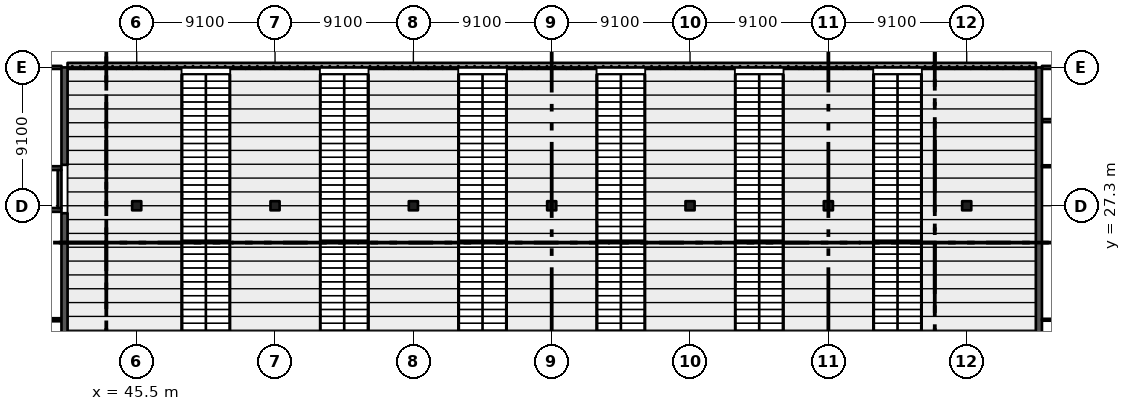
"""IFC4 building model, lengths in metres.
Left out: names, types, materials, properties, quantities, classifications, styles, units other than length and angle.
Written with IfcOpenShell. Run it as: python <this file> out.ifc"""

import sys

from ifc_helpers import new_model, si_unit, direction, frame, frame_2d, origin, origin_2d, place, context, subcontext, project, spatial, rectangle, extrude, element, save


model = new_model("IFC4")
c1 = context("Model", 3, precision=1e-05, world=origin(), true_north=direction((0.0, 1.0)))
c2 = subcontext(c1, "Body", "Model", "MODEL_VIEW")
j1 = project(units=[si_unit("LENGTHUNIT", "METRE"), si_unit("PLANEANGLEUNIT", "RADIAN")], contexts=[c1])
p1 = place(None, origin())
s1 = spatial("IfcSite", under=j1, at=p1, CompositionType="ELEMENT")
p2 = place(p1, origin())
s2 = spatial("IfcBuilding", under=s1, at=p2, CompositionType="ELEMENT")
p3 = place(p2, origin())
s3 = spatial("IfcBuildingStorey", under=s2, at=p3, CompositionType="ELEMENT", Elevation=0.0)
for number, where, z_axis, x_axis in (
    (1, (45.5, 27.3, -0.4), (0.0, 0.0, 1.0), (1.0, 0.0, 0.0)),
    (2, (54.6, 27.3, -0.4), (0.0, 0.0, 1.0), (1.0, 0.0, 0.0)),
    (3, (63.7, 27.3, -0.4), (0.0, 0.0, 1.0), (1.0, 0.0, 0.0)),
    (4, (72.8, 27.3, -0.4), (0.0, 0.0, 1.0), (1.0, 0.0, 0.0)),
    (5, (81.9, 27.3, -0.4), (0.0, 0.0, 1.0), (1.0, 0.0, 0.0)),
    (6, (91.0, 27.3, -0.4), (0.0, 0.0, 1.0), (1.0, 0.0, 0.0)),
    (7, (100.1, 27.3, -0.4), (0.0, 0.0, 1.0), (1.0, 0.0, 0.0)),
):
    element("IfcColumn", number, at=place(p3, frame(where, z_axis=z_axis, x_axis=x_axis)), inside=s3, PredefinedType="COLUMN", context=c2, shape_type="SweptSolid", body=[
        extrude(rectangle(XDim=0.6, YDim=0.6, at=origin_2d()), origin(), (0.0, 0.0, 1.0), 2.133),
    ])
p4 = place(p3, frame((40.95, 36.55, -0.4), z_axis=(0.0, 0.0, 1.0), x_axis=(1.0, 0.0, 0.0)))
e8 = element("IfcWall", 8, at=p4, inside=s3, PredefinedType="SOLIDWALL", context=c2, shape_type="SweptSolid", body=[
    extrude(rectangle(XDim=63.7, YDim=0.3, at=frame_2d((31.85, 0.0))), origin(), (0.0, 0.0, 1.0), 1.45),
])
p5 = place(p3, frame((40.75, 26.809, -0.4), z_axis=(0.0, 0.0, 1.0), x_axis=(0.0, -1.0, 0.0)))
e9 = element("IfcWall", 9, at=p5, inside=s3, PredefinedType="SHEAR", context=c2, shape_type="SweptSolid", body=[
    extrude(rectangle(XDim=8.609, YDim=0.4, at=frame_2d((4.304, 0.0))), origin(), (0.0, 0.0, 1.0), 6.77),
])
p6 = place(p3, frame((40.75, 36.4, -0.4), z_axis=(0.0, 0.0, 1.0), x_axis=(0.0, -1.0, 0.0)))
e10 = element("IfcWall", 10, at=p6, inside=s3, PredefinedType="SHEAR", context=c2, shape_type="SweptSolid", body=[
    extrude(rectangle(XDim=6.409, YDim=0.4, at=frame_2d((3.205, 0.0))), origin(), (0.0, 0.0, 1.0), 6.77),
])
p7 = place(p3, frame((104.85, 36.4, -0.4), z_axis=(0.0, 0.0, 1.0), x_axis=(0.0, -1.0, 0.0)))
e11 = element("IfcWall", 11, at=p7, inside=s3, PredefinedType="SHEAR", context=c2, shape_type="SweptSolid", body=[
    extrude(rectangle(XDim=18.2, YDim=0.4, at=frame_2d((9.1, 0.0))), origin(), (0.0, 0.0, 1.0), 6.77),
])
for number, where, z_axis, x_axis in (
    (12, (40.55, 27.025, -0.4), (0.0, 0.0, 1.0), (-1.0, 0.0, 0.0)),
    (13, (40.55, 29.775, -0.4), (0.0, 0.0, 1.0), (-1.0, 0.0, 0.0)),
):
    element("IfcWall", number, at=place(p3, frame(where, z_axis=z_axis, x_axis=x_axis)), inside=s3, PredefinedType="SHEAR", context=c2, shape_type="SweptSolid", body=[
        extrude(rectangle(XDim=2.4, YDim=0.25, at=frame_2d((1.2, 0.0))), origin(), (0.0, 0.0, 1.0), 6.77),
    ])
p8 = place(p3, frame((40.425, 29.65, -0.4), z_axis=(0.0, 0.0, 1.0), x_axis=(0.0, -1.0, 0.0)))
e14 = element("IfcWall", 14, at=p8, inside=s3, PredefinedType="SHEAR", context=c2, shape_type="SweptSolid", body=[
    extrude(rectangle(XDim=2.5, YDim=0.25, at=frame_2d((1.25, 0.0))), origin(), (0.0, 0.0, 1.0), 6.77),
])
p9 = place(p3, frame((36.4, 19.8, 0.0), z_axis=(0.0, 0.0, 1.0), x_axis=(1.0, 0.0, 0.0)))
e15 = element("IfcWall", 15, at=p9, inside=s3, PredefinedType="PARTITIONING", context=c2, shape_type="SweptSolid", body=[
    extrude(rectangle(XDim=4.15, YDim=0.2, at=frame_2d((2.075, 0.0))), origin(), (0.0, 0.0, 1.0), 6.02),
])
p10 = place(p9, frame((1.15, 0.0, 0.0)))
e16 = element("IfcOpeningElement", 16, at=p10, cuts=e15, PredefinedType="OPENING", context=c2, shape_type="SweptSolid", body=[
    extrude(rectangle(XDim=1.8, YDim=2.4, at=frame_2d((0.9, 1.2))), frame((0.0, 0.11, 0.0), z_axis=(0.0, -1.0, 0.0), x_axis=(1.0, 0.0, 0.0)), (0.0, 0.0, 1.0), 0.22),
])
p11 = place(p3, frame((36.875, 36.4, 0.0), z_axis=(0.0, 0.0, 1.0), x_axis=(1.0, 0.0, 0.0)))
e17 = element("IfcWall", 17, at=p11, inside=s3, PredefinedType="PARTITIONING", context=c2, shape_type="SweptSolid", body=[
    extrude(rectangle(XDim=3.675, YDim=0.2, at=frame_2d((1.837, 0.0))), origin(), (0.0, 0.0, 1.0), 6.02),
])
p12 = place(p11, frame((0.65, 0.0, 0.0)))
e18 = element("IfcOpeningElement", 18, at=p12, cuts=e17, PredefinedType="OPENING", context=c2, shape_type="SweptSolid", body=[
    extrude(rectangle(XDim=2.4, YDim=2.4, at=frame_2d((1.2, 1.2))), frame((0.0, 0.11, 0.0), z_axis=(0.0, -1.0, 0.0), x_axis=(1.0, 0.0, 0.0)), (0.0, 0.0, 1.0), 0.22),
])
p13 = place(p3, frame((105.05, 19.8, 0.0), z_axis=(0.0, 0.0, 1.0), x_axis=(1.0, 0.0, 0.0)))
e19 = element("IfcWall", 19, at=p13, inside=s3, PredefinedType="PARTITIONING", context=c2, shape_type="SweptSolid", body=[
    extrude(rectangle(XDim=3.512, YDim=0.125, at=frame_2d((1.756, 0.0))), origin(), (0.0, 0.0, 1.0), 6.02),
])
p14 = place(p13, frame((1.35, 0.0, 0.0)))
e20 = element("IfcOpeningElement", 20, at=p14, cuts=e19, PredefinedType="OPENING", context=c2, shape_type="SweptSolid", body=[
    extrude(rectangle(XDim=0.9, YDim=2.1, at=frame_2d((0.45, 1.05))), frame((0.0, 0.073, 0.0), z_axis=(0.0, -1.0, 0.0), x_axis=(1.0, 0.0, 0.0)), (0.0, 0.0, 1.0), 0.145),
])
p15 = place(p3, frame((105.05, 29.9, 0.0), z_axis=(0.0, 0.0, 1.0), x_axis=(1.0, 0.0, 0.0)))
e21 = element("IfcWall", 21, at=p15, inside=s3, PredefinedType="PARTITIONING", context=c2, shape_type="SweptSolid", body=[
    extrude(rectangle(XDim=0.72, YDim=0.125, at=frame_2d((0.36, 0.0))), origin(), (0.0, 0.0, 1.0), 6.02),
])
p16 = place(p3, frame((105.05, 32.9, 0.0), z_axis=(0.0, 0.0, 1.0), x_axis=(1.0, 0.0, 0.0)))
e22 = element("IfcWall", 22, at=p16, inside=s3, PredefinedType="PARTITIONING", context=c2, shape_type="SweptSolid", body=[
    extrude(rectangle(XDim=4.15, YDim=0.2, at=frame_2d((2.075, 0.0))), origin(), (0.0, 0.0, 1.0), 6.02),
])
p17 = place(p16, frame((0.85, 0.0, 0.0)))
e23 = element("IfcOpeningElement", 23, at=p17, cuts=e22, PredefinedType="OPENING", context=c2, shape_type="SweptSolid", body=[
    extrude(rectangle(XDim=2.4, YDim=2.4, at=frame_2d((1.2, 1.2))), frame((0.0, 0.11, 0.0), z_axis=(0.0, -1.0, 0.0), x_axis=(1.0, 0.0, 0.0)), (0.0, 0.0, 1.0), 0.22),
])
p18 = place(p3, frame((105.05, 36.4, 0.0), z_axis=(0.0, 0.0, 1.0), x_axis=(1.0, 0.0, 0.0)))
e24 = element("IfcWall", 24, at=p18, inside=s3, PredefinedType="PARTITIONING", context=c2, shape_type="SweptSolid", body=[
    extrude(rectangle(XDim=3.675, YDim=0.2, at=frame_2d((1.837, 0.0))), origin(), (0.0, 0.0, 1.0), 6.02),
])
p19 = place(p18, frame((0.65, 0.0, 0.0)))
e25 = element("IfcOpeningElement", 25, at=p19, cuts=e24, PredefinedType="OPENING", context=c2, shape_type="SweptSolid", body=[
    extrude(rectangle(XDim=2.4, YDim=2.4, at=frame_2d((1.2, 1.2))), frame((0.0, 0.11, 0.0), z_axis=(0.0, -1.0, 0.0), x_axis=(1.0, 0.0, 0.0)), (0.0, 0.0, 1.0), 0.22),
])
save(model, sys.argv[1])
